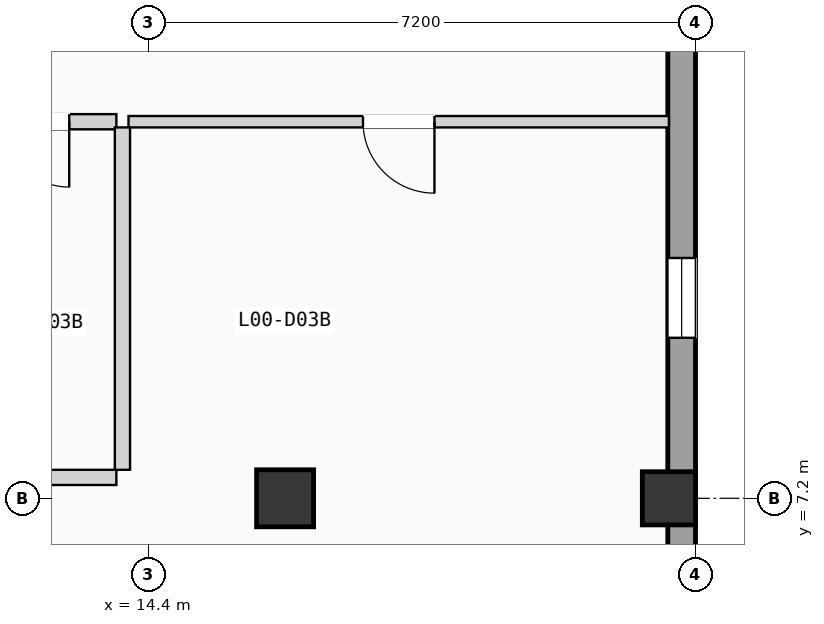
"""IFC4 building model, lengths in metres.
Left out: names, types, materials, properties, quantities, classifications, styles, units other than length and angle.
Written with IfcOpenShell. Run it as: python <this file> out.ifc"""

import sys

from ifc_helpers import new_model, si_unit, direction, frame, frame_2d, origin, origin_2d, place, context, subcontext, project, spatial, rectangle, extrude, element, fill, save


model = new_model("IFC4")
c1 = context("Model", 3, precision=1e-05, world=origin(), true_north=direction((0.0, 1.0)))
c2 = subcontext(c1, "Body", "Model", "MODEL_VIEW")
j1 = project(units=[si_unit("LENGTHUNIT", "METRE"), si_unit("PLANEANGLEUNIT", "RADIAN")], contexts=[c1])
p1 = place(None, origin())
s1 = spatial("IfcSite", under=j1, at=p1, CompositionType="ELEMENT")
p2 = place(p1, origin())
s2 = spatial("IfcBuilding", under=s1, at=p2, CompositionType="ELEMENT")
p3 = place(p2, origin())
s3 = spatial("IfcBuildingStorey", under=s2, at=p3, CompositionType="ELEMENT", Elevation=0.0)
p4 = place(p3, frame((16.2, 7.2, 0.0), z_axis=(0.0, 0.0, 1.0), x_axis=(1.0, 0.0, 0.0)))
e1 = element("IfcColumn", 1, at=p4, inside=s3, PredefinedType="COLUMN", context=c2, shape_type="SweptSolid", body=[
    extrude(rectangle(XDim=0.75, YDim=0.75, at=origin_2d()), origin(), (0.0, 0.0, 1.0), 4.9),
])
p5 = place(p3, frame((21.25, 7.2, 0.0), z_axis=(0.0, 0.0, 1.0), x_axis=(1.0, 0.0, 0.0)))
e2 = element("IfcColumn", 2, at=p5, inside=s3, PredefinedType="COLUMN", context=c2, shape_type="SweptSolid", body=[
    extrude(rectangle(XDim=0.7, YDim=0.7, at=origin_2d()), origin(), (0.0, 0.0, 1.0), 4.9),
])
p6 = place(p3, frame((21.417, 0.365, 0.0), z_axis=(0.0, 0.0, 1.0), x_axis=(0.0, 1.0, 0.0)))
e3 = element("IfcWall", 3, at=p6, inside=s3, PredefinedType="SOLIDWALL", context=c2, shape_type="SweptSolid", body=[
    extrude(rectangle(XDim=49.67, YDim=0.365, at=frame_2d((24.835, 0.0))), origin(), (0.0, 0.0, 1.0), 4.64),
])
p7 = place(p6, frame((23.935, 0.0, 0.0)))
e4 = element("IfcOpeningElement", 4, at=p7, cuts=e3, PredefinedType="OPENING", context=c2, shape_type="SweptSolid", body=[
    extrude(rectangle(XDim=1.8, YDim=2.35, at=frame_2d((0.9, 1.175))), frame((0.0, 0.192, 0.0), z_axis=(0.0, -1.0, 0.0), x_axis=(1.0, 0.0, 0.0)), (0.0, 0.0, 1.0), 0.385),
])
p8 = place(p6, frame((15.274, 0.0, 0.9)))
e5 = element("IfcOpeningElement", 5, at=p8, cuts=e3, PredefinedType="OPENING", context=c2, shape_type="SweptSolid", body=[
    extrude(rectangle(XDim=1.05, YDim=1.35, at=frame_2d((0.525, 0.675))), frame((0.0, 0.192, 0.0), z_axis=(0.0, -1.0, 0.0), x_axis=(1.0, 0.0, 0.0)), (0.0, 0.0, 1.0), 0.385),
])
p9 = place(p6, frame((8.947, 0.0, 0.9)))
e6 = element("IfcOpeningElement", 6, at=p9, cuts=e3, PredefinedType="OPENING", context=c2, shape_type="SweptSolid", body=[
    extrude(rectangle(XDim=1.05, YDim=1.5, at=frame_2d((0.525, 0.75))), frame((0.0, 0.192, 0.0), z_axis=(0.0, -1.0, 0.0), x_axis=(1.0, 0.0, 0.0)), (0.0, 0.0, 1.0), 0.385),
])
p10 = place(p6, frame((18.685, 0.0, 0.9)))
e7 = element("IfcOpeningElement", 7, at=p10, cuts=e3, PredefinedType="OPENING", context=c2, shape_type="SweptSolid", body=[
    extrude(rectangle(XDim=1.05, YDim=1.65, at=frame_2d((0.525, 0.825))), frame((0.0, 0.192, 0.0), z_axis=(0.0, -1.0, 0.0), x_axis=(1.0, 0.0, 0.0)), (0.0, 0.0, 1.0), 0.385),
])
p11 = place(p3, frame((11.872, 7.475, 0.0), z_axis=(0.0, 0.0, 1.0), x_axis=(1.0, 0.0, 0.0)))
e8 = element("IfcWall", 8, at=p11, inside=s3, PredefinedType="PLUMBINGWALL", context=c2, shape_type="SweptSolid", body=[
    extrude(rectangle(XDim=2.108, YDim=0.2, at=frame_2d((1.054, 0.0))), origin(), (0.0, 0.0, 1.0), 3.84),
])
p12 = place(p3, frame((11.872, 12.155, 0.0), z_axis=(0.0, 0.0, 1.0), x_axis=(1.0, 0.0, 0.0)))
e9 = element("IfcWall", 9, at=p12, inside=s3, PredefinedType="PLUMBINGWALL", context=c2, shape_type="SweptSolid", body=[
    extrude(rectangle(XDim=2.108, YDim=0.2, at=frame_2d((1.054, 0.0))), origin(), (0.0, 0.0, 1.0), 3.84),
])
p13 = place(p12, frame((0.628, 0.0, 0.0)))
e10 = element("IfcOpeningElement", 10, at=p13, cuts=e9, PredefinedType="OPENING", context=c2, shape_type="SweptSolid", body=[
    extrude(rectangle(XDim=0.86, YDim=2.0, at=frame_2d((0.43, 1.0))), frame((0.0, 0.11, 0.0), z_axis=(0.0, -1.0, 0.0), x_axis=(1.0, 0.0, 0.0)), (0.0, 0.0, 1.0), 0.22),
])
p14 = place(p3, frame((14.14, 12.155, 0.0), z_axis=(0.0, 0.0, 1.0), x_axis=(1.0, 0.0, 0.0)))
e11 = element("IfcWall", 11, at=p14, inside=s3, PredefinedType="PARTITIONING", context=c2, shape_type="SweptSolid", body=[
    extrude(rectangle(XDim=7.11, YDim=0.15, at=frame_2d((3.555, 0.0))), origin(), (0.0, 0.0, 1.0), 3.84),
])
p15 = place(p14, frame((3.085, 0.0, 0.0)))
e12 = element("IfcOpeningElement", 12, at=p15, cuts=e11, PredefinedType="OPENING", context=c2, shape_type="SweptSolid", body=[
    extrude(rectangle(XDim=0.94, YDim=2.06, at=frame_2d((0.47, 1.03))), frame((0.0, 0.085, 0.0), z_axis=(0.0, -1.0, 0.0), x_axis=(1.0, 0.0, 0.0)), (0.0, 0.0, 1.0), 0.17),
])
p16 = place(p3, frame((14.06, 7.575, 0.0), z_axis=(0.0, 0.0, 1.0), x_axis=(0.0, 1.0, 0.0)))
e13 = element("IfcWall", 13, at=p16, inside=s3, PredefinedType="PLUMBINGWALL", context=c2, shape_type="SweptSolid", body=[
    extrude(rectangle(XDim=4.505, YDim=0.2, at=frame_2d((2.252, 0.0))), origin(), (0.0, 0.0, 1.0), 3.84),
])
p17 = place(p9, origin())
e14 = element("IfcWindow", 14, at=p17, inside=s3, PartitioningType="SINGLE_PANEL", PredefinedType="WINDOW", context=c2, shape_type="SweptSolid", body=[
    extrude(rectangle(XDim=1.05, YDim=1.5, at=frame_2d((0.525, 0.75))), frame((0.0, 0.03, 0.0), z_axis=(0.0, -1.0, 0.0), x_axis=(1.0, 0.0, 0.0)), (0.0, 0.0, 1.0), 0.06),
])
fill(e6, e14)
p18 = place(p13, frame((0.86, 0.0, 0.0), z_axis=(0.0, 0.0, 1.0), x_axis=(-1.0, 0.0, 0.0)))
e15 = element("IfcDoor", 15, at=p18, inside=s3, OperationType="SINGLE_SWING_RIGHT", PredefinedType="DOOR", context=c2, shape_type="SweptSolid", body=[
    extrude(rectangle(XDim=0.86, YDim=2.0, at=frame_2d((0.43, 1.0))), frame((0.0, 0.025, 0.0), z_axis=(0.0, -1.0, 0.0), x_axis=(1.0, 0.0, 0.0)), (0.0, 0.0, 1.0), 0.05),
])
fill(e10, e15)
p19 = place(p15, frame((0.94, 0.0, 0.0), z_axis=(0.0, 0.0, 1.0), x_axis=(-1.0, 0.0, 0.0)))
e16 = element("IfcDoor", 16, at=p19, inside=s3, OperationType="SINGLE_SWING_RIGHT", PredefinedType="DOOR", context=c2, shape_type="SweptSolid", body=[
    extrude(rectangle(XDim=0.94, YDim=2.06, at=frame_2d((0.47, 1.03))), frame((0.0, 0.025, 0.0), z_axis=(0.0, -1.0, 0.0), x_axis=(1.0, 0.0, 0.0)), (0.0, 0.0, 1.0), 0.05),
])
fill(e12, e16)
save(model, sys.argv[1])
